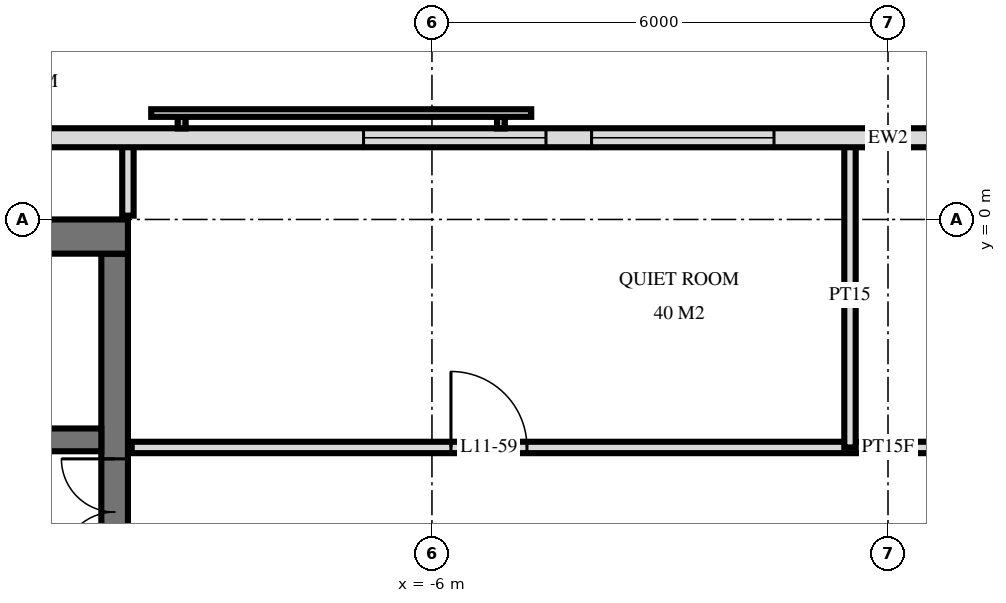
"""IFC4 building model, lengths in metres.
Left out: names, types, materials, properties, quantities, classifications, styles, units other than length and angle.
Written with IfcOpenShell. Run it as: python <this file> out.ifc"""

import sys

from ifc_helpers import new_model, si_unit, direction, frame, frame_2d, origin, place, context, subcontext, project, spatial, rectangle, extrude, element, fill, save


model = new_model("IFC4")
c1 = context("Model", 3, precision=1e-05, world=origin(), true_north=direction((0.0, 1.0)))
c2 = subcontext(c1, "Body", "Model", "MODEL_VIEW")
j1 = project(units=[si_unit("LENGTHUNIT", "METRE"), si_unit("PLANEANGLEUNIT", "RADIAN")], contexts=[c1])
p1 = place(None, origin())
s1 = spatial("IfcSite", under=j1, at=p1, CompositionType="ELEMENT")
p2 = place(p1, origin())
s2 = spatial("IfcBuilding", under=s1, at=p2, CompositionType="ELEMENT")
p3 = place(p2, frame((0.0, 0.0, 49.2)))
s3 = spatial("IfcBuildingStorey", under=s2, at=p3, CompositionType="ELEMENT", Elevation=49.2)
p4 = place(p3, frame((-29.5, -0.225, 0.0), z_axis=(0.0, 0.0, 1.0), x_axis=(1.0, 0.0, 0.0)))
e1 = element("IfcWall", 1, at=p4, inside=s3, PredefinedType="SHEAR", context=c2, shape_type="SweptSolid", body=[
    extrude(rectangle(XDim=19.5, YDim=0.45, at=frame_2d((9.75, 0.0))), origin(), (0.0, 0.0, 1.0), 3.6),
])
p5 = place(p3, frame((-10.175, -14.55, 0.0), z_axis=(0.0, 0.0, 1.0), x_axis=(0.0, 1.0, 0.0)))
e2 = element("IfcWall", 2, at=p5, inside=s3, PredefinedType="SHEAR", context=c2, shape_type="SweptSolid", body=[
    extrude(rectangle(XDim=14.1, YDim=0.35, at=frame_2d((7.05, 0.0))), origin(), (0.0, 0.0, 1.0), 3.6),
])
p6 = place(p5, frame((8.4, 0.0, 0.0)))
e3 = element("IfcOpeningElement", 3, at=p6, cuts=e2, PredefinedType="OPENING", context=c2, shape_type="SweptSolid", body=[
    extrude(rectangle(XDim=1.4, YDim=2.4, at=frame_2d((0.7, 1.2))), frame((0.0, 0.185, 0.0), z_axis=(0.0, -1.0, 0.0), x_axis=(1.0, 0.0, 0.0)), (0.0, 0.0, 1.0), 0.37),
])
p7 = place(p5, frame((10.0, 0.0, 0.0)))
e4 = element("IfcOpeningElement", 4, at=p7, cuts=e2, PredefinedType="OPENING", context=c2, shape_type="SweptSolid", body=[
    extrude(rectangle(XDim=1.4, YDim=2.4, at=frame_2d((0.7, 1.2))), frame((0.0, 0.185, 0.0), z_axis=(0.0, -1.0, 0.0), x_axis=(1.0, 0.0, 0.0)), (0.0, 0.0, 1.0), 0.37),
])
p8 = place(p5, frame((4.0, 0.0, 0.0)))
e5 = element("IfcOpeningElement", 5, at=p8, cuts=e2, PredefinedType="OPENING", context=c2, shape_type="SweptSolid", body=[
    extrude(rectangle(XDim=1.2, YDim=2.1, at=frame_2d((0.6, 1.05))), frame((0.0, 0.185, 0.0), z_axis=(0.0, -1.0, 0.0), x_axis=(1.0, 0.0, 0.0)), (0.0, 0.0, 1.0), 0.37),
])
p9 = place(p3, frame((-29.05, -2.9, 0.0), z_axis=(0.0, 0.0, 1.0), x_axis=(1.0, 0.0, 0.0)))
e6 = element("IfcWall", 6, at=p9, inside=s3, PredefinedType="SHEAR", context=c2, shape_type="SweptSolid", body=[
    extrude(rectangle(XDim=18.7, YDim=0.3, at=frame_2d((9.35, 0.0))), origin(), (0.0, 0.0, 1.0), 3.6),
])
p10 = place(p9, frame((2.95, 0.0, 0.0)))
e7 = element("IfcOpeningElement", 7, at=p10, cuts=e6, PredefinedType="OPENING", context=c2, shape_type="SweptSolid", body=[
    extrude(rectangle(XDim=1.1, YDim=2.1, at=frame_2d((0.55, 1.05))), frame((0.0, 0.16, 0.0), z_axis=(0.0, -1.0, 0.0), x_axis=(1.0, 0.0, 0.0)), (0.0, 0.0, 1.0), 0.32),
])
p11 = place(p9, frame((0.55, 0.0, 0.0)))
e8 = element("IfcOpeningElement", 8, at=p11, cuts=e6, PredefinedType="OPENING", context=c2, shape_type="SweptSolid", body=[
    extrude(rectangle(XDim=1.1, YDim=2.1, at=frame_2d((0.55, 1.05))), frame((0.0, 0.16, 0.0), z_axis=(0.0, -1.0, 0.0), x_axis=(1.0, 0.0, 0.0)), (0.0, 0.0, 1.0), 0.32),
])
p12 = place(p9, frame((10.9, 0.0, 0.0)))
e9 = element("IfcOpeningElement", 9, at=p12, cuts=e6, PredefinedType="OPENING", context=c2, shape_type="SweptSolid", body=[
    extrude(rectangle(XDim=0.9, YDim=2.1, at=frame_2d((0.45, 1.05))), frame((0.0, 0.16, 0.0), z_axis=(0.0, -1.0, 0.0), x_axis=(1.0, 0.0, 0.0)), (0.0, 0.0, 1.0), 0.32),
])
p13 = place(p9, frame((16.85, 0.0, 0.0)))
e10 = element("IfcOpeningElement", 10, at=p13, cuts=e6, PredefinedType="OPENING", context=c2, shape_type="SweptSolid", body=[
    extrude(rectangle(XDim=1.0, YDim=2.1, at=frame_2d((0.5, 1.05))), frame((0.0, 0.16, 0.0), z_axis=(0.0, -1.0, 0.0), x_axis=(1.0, 0.0, 0.0)), (0.0, 0.0, 1.0), 0.32),
])
p14 = place(p9, frame((14.312, 0.0, 0.0)))
e11 = element("IfcOpeningElement", 11, at=p14, cuts=e6, PredefinedType="OPENING", context=c2, shape_type="SweptSolid", body=[
    extrude(rectangle(XDim=1.0, YDim=2.1, at=frame_2d((0.5, 1.05))), frame((0.0, 0.16, 0.0), z_axis=(0.0, -1.0, 0.0), x_axis=(1.0, 0.0, 0.0)), (0.0, 0.0, 1.0), 0.32),
])
p15 = place(p9, frame((12.887, 0.0, 0.0)))
e12 = element("IfcOpeningElement", 12, at=p15, cuts=e6, PredefinedType="OPENING", context=c2, shape_type="SweptSolid", body=[
    extrude(rectangle(XDim=1.0, YDim=2.1, at=frame_2d((0.5, 1.05))), frame((0.0, 0.16, 0.0), z_axis=(0.0, -1.0, 0.0), x_axis=(1.0, 0.0, 0.0)), (0.0, 0.0, 1.0), 0.32),
])
p16 = place(p9, frame((5.6, 0.0, 0.0)))
e13 = element("IfcOpeningElement", 13, at=p16, cuts=e6, PredefinedType="OPENING", context=c2, shape_type="SweptSolid", body=[
    extrude(rectangle(XDim=1.0, YDim=2.1, at=frame_2d((0.5, 1.05))), frame((0.0, 0.16, 0.0), z_axis=(0.0, -1.0, 0.0), x_axis=(1.0, 0.0, 0.0)), (0.0, 0.0, 1.0), 0.32),
])
p17 = place(p3, frame((28.775, 1.075, 0.0), z_axis=(0.0, 0.0, 1.0), x_axis=(-1.0, 0.0, 0.0)))
e14 = element("IfcWall", 14, at=p17, inside=s3, PredefinedType="SOLIDWALL", context=c2, shape_type="SweptSolid", body=[
    extrude(rectangle(XDim=57.551, YDim=0.25, at=frame_2d((28.775, 0.0))), origin(), (0.0, 0.0, 1.0), 3.32),
])
p18 = place(p17, frame((25.575, 0.0, 0.3)))
e15 = element("IfcOpeningElement", 15, at=p18, cuts=e14, PredefinedType="OPENING", context=c2, shape_type="SweptSolid", body=[
    extrude(rectangle(XDim=2.4, YDim=2.1, at=frame_2d((1.2, 1.05))), frame((0.0, 0.135, 0.0), z_axis=(0.0, -1.0, 0.0), x_axis=(1.0, 0.0, 0.0)), (0.0, 0.0, 1.0), 0.27),
])
p19 = place(p17, frame((30.275, 0.0, 0.3)))
e16 = element("IfcOpeningElement", 16, at=p19, cuts=e14, PredefinedType="OPENING", context=c2, shape_type="SweptSolid", body=[
    extrude(rectangle(XDim=2.4, YDim=2.1, at=frame_2d((1.2, 1.05))), frame((0.0, 0.135, 0.0), z_axis=(0.0, -1.0, 0.0), x_axis=(1.0, 0.0, 0.0)), (0.0, 0.0, 1.0), 0.27),
])
p20 = place(p17, frame((33.275, 0.0, 0.3)))
e17 = element("IfcOpeningElement", 17, at=p20, cuts=e14, PredefinedType="OPENING", context=c2, shape_type="SweptSolid", body=[
    extrude(rectangle(XDim=2.4, YDim=2.1, at=frame_2d((1.2, 1.05))), frame((0.0, 0.135, 0.0), z_axis=(0.0, -1.0, 0.0), x_axis=(1.0, 0.0, 0.0)), (0.0, 0.0, 1.0), 0.27),
])
p21 = place(p3, frame((-0.5, -3.0, 0.0), z_axis=(0.0, 0.0, 1.0), x_axis=(0.0, 1.0, 0.0)))
e18 = element("IfcWall", 18, at=p21, inside=s3, PredefinedType="PARTITIONING", context=c2, shape_type="SweptSolid", body=[
    extrude(rectangle(XDim=4.02, YDim=0.15, at=frame_2d((2.01, 0.0))), origin(), (0.0, 0.0, 1.0), 3.32),
])
p22 = place(p3, frame((-10.0, 0.05, 0.0), z_axis=(0.0, 0.0, 1.0), x_axis=(0.0, 1.0, 0.0)))
e19 = element("IfcWall", 19, at=p22, inside=s3, PredefinedType="PARTITIONING", context=c2, shape_type="SweptSolid", body=[
    extrude(rectangle(XDim=0.97, YDim=0.15, at=frame_2d((0.485, 0.0))), origin(), (0.0, 0.0, 1.0), 3.32),
])
p23 = place(p3, frame((-9.95, -3.0, 0.0), z_axis=(0.0, 0.0, 1.0), x_axis=(1.0, 0.0, 0.0)))
e20 = element("IfcWall", 20, at=p23, inside=s3, PredefinedType="PARTITIONING", context=c2, shape_type="SweptSolid", body=[
    extrude(rectangle(XDim=19.9, YDim=0.15, at=frame_2d((9.95, 0.0))), origin(), (0.0, 0.0, 1.0), 3.32),
])
p24 = place(p23, frame((4.2, 0.0, 0.0)))
e21 = element("IfcOpeningElement", 21, at=p24, cuts=e20, PredefinedType="OPENING", context=c2, shape_type="SweptSolid", body=[
    extrude(rectangle(XDim=1.0, YDim=2.1, at=frame_2d((0.5, 1.05))), frame((0.0, 0.085, 0.0), z_axis=(0.0, -1.0, 0.0), x_axis=(1.0, 0.0, 0.0)), (0.0, 0.0, 1.0), 0.17),
])
p25 = place(p23, frame((11.45, 0.0, 0.0)))
e22 = element("IfcOpeningElement", 22, at=p25, cuts=e20, PredefinedType="OPENING", context=c2, shape_type="SweptSolid", body=[
    extrude(rectangle(XDim=1.0, YDim=2.1, at=frame_2d((0.5, 1.05))), frame((0.0, 0.085, 0.0), z_axis=(0.0, -1.0, 0.0), x_axis=(1.0, 0.0, 0.0)), (0.0, 0.0, 1.0), 0.17),
])
p26 = place(p23, frame((15.45, 0.0, 0.0)))
e23 = element("IfcOpeningElement", 23, at=p26, cuts=e20, PredefinedType="OPENING", context=c2, shape_type="SweptSolid", body=[
    extrude(rectangle(XDim=1.0, YDim=2.1, at=frame_2d((0.5, 1.05))), frame((0.0, 0.085, 0.0), z_axis=(0.0, -1.0, 0.0), x_axis=(1.0, 0.0, 0.0)), (0.0, 0.0, 1.0), 0.17),
])
p27 = place(p23, frame((18.2, 0.0, 0.0)))
e24 = element("IfcOpeningElement", 24, at=p27, cuts=e20, PredefinedType="OPENING", context=c2, shape_type="SweptSolid", body=[
    extrude(rectangle(XDim=1.0, YDim=2.1, at=frame_2d((0.5, 1.05))), frame((0.0, 0.085, 0.0), z_axis=(0.0, -1.0, 0.0), x_axis=(1.0, 0.0, 0.0)), (0.0, 0.0, 1.0), 0.17),
])
p28 = place(p19, origin())
e25 = element("IfcWindow", 25, at=p28, inside=s3, PartitioningType="SINGLE_PANEL", PredefinedType="WINDOW", context=c2, shape_type="SweptSolid", body=[
    extrude(rectangle(XDim=2.4, YDim=2.1, at=frame_2d((1.2, 1.05))), frame((0.0, 0.03, 0.0), z_axis=(0.0, -1.0, 0.0), x_axis=(1.0, 0.0, 0.0)), (0.0, 0.0, 1.0), 0.06),
])
fill(e16, e25)
p29 = place(p20, origin())
e26 = element("IfcWindow", 26, at=p29, inside=s3, PartitioningType="SINGLE_PANEL", PredefinedType="WINDOW", context=c2, shape_type="SweptSolid", body=[
    extrude(rectangle(XDim=2.4, YDim=2.1, at=frame_2d((1.2, 1.05))), frame((0.0, 0.03, 0.0), z_axis=(0.0, -1.0, 0.0), x_axis=(1.0, 0.0, 0.0)), (0.0, 0.0, 1.0), 0.06),
])
fill(e17, e26)
p30 = place(p7, origin())
e27 = element("IfcDoor", 27, at=p30, inside=s3, OperationType="DOUBLE_DOOR_SINGLE_SWING", PredefinedType="DOOR", context=c2, shape_type="SweptSolid", body=[
    extrude(rectangle(XDim=1.4, YDim=2.4, at=frame_2d((0.7, 1.2))), frame((0.0, 0.025, 0.0), z_axis=(0.0, -1.0, 0.0), x_axis=(1.0, 0.0, 0.0)), (0.0, 0.0, 1.0), 0.05),
])
fill(e4, e27)
p31 = place(p24, origin())
e28 = element("IfcDoor", 28, at=p31, inside=s3, OperationType="SINGLE_SWING_RIGHT", PredefinedType="DOOR", context=c2, shape_type="SweptSolid", body=[
    extrude(rectangle(XDim=1.0, YDim=2.1, at=frame_2d((0.5, 1.05))), frame((0.0, 0.025, 0.0), z_axis=(0.0, -1.0, 0.0), x_axis=(1.0, 0.0, 0.0)), (0.0, 0.0, 1.0), 0.05),
])
fill(e21, e28)
save(model, sys.argv[1])
